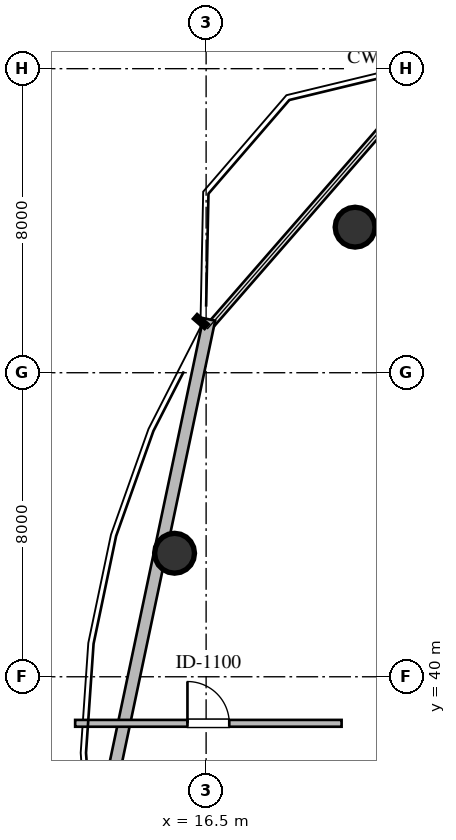
"""IFC4 building model, lengths in metres.
Left out: names, types, materials, properties, quantities, classifications, styles, units other than length and angle.
Written with IfcOpenShell. Run it as: python <this file> out.ifc"""

import sys

from ifc_helpers import new_model, si_unit, direction, frame, frame_2d, origin, origin_2d, place, context, subcontext, project, spatial, rectangle, circle, extrude, element, fill, save


model = new_model("IFC4")
c1 = context("Model", 3, precision=1e-05, world=origin(), true_north=direction((0.0, 1.0)))
c2 = subcontext(c1, "Body", "Model", "MODEL_VIEW")
j1 = project(units=[si_unit("LENGTHUNIT", "METRE"), si_unit("PLANEANGLEUNIT", "RADIAN")], contexts=[c1])
p1 = place(None, origin())
s1 = spatial("IfcSite", under=j1, at=p1, CompositionType="ELEMENT")
p2 = place(p1, origin())
s2 = spatial("IfcBuilding", under=s1, at=p2, CompositionType="ELEMENT")
p3 = place(p2, frame((0.0, 0.0, 228.0)))
s3 = spatial("IfcBuildingStorey", under=s2, at=p3, CompositionType="ELEMENT", Elevation=228.0)
for number, where, z_axis, x_axis in (
    (1, (20.42, 51.83, 0.0), (0.0, 0.0, 1.0), (1.0, 0.0, 0.0)),
    (2, (15.67, 43.25, 0.0), (0.0, 0.0, 1.0), (1.0, 0.0, 0.0)),
):
    element("IfcColumn", number, at=place(p3, frame(where, z_axis=z_axis, x_axis=x_axis)), inside=s3, PredefinedType="COLUMN", context=c2, shape_type="SweptSolid", body=[
        extrude(circle(Radius=0.525, at=origin_2d()), origin(), (0.0, 0.0, 1.0), 3.6),
    ])
p4 = place(p3, frame((13.525, 34.903, 0.0), z_axis=(0.0, 0.0, 1.0), x_axis=(0.206301080321, 0.978488561128, 0.0)))
e3 = element("IfcWall", 3, at=p4, inside=s3, PredefinedType="STANDARD", context=c2, shape_type="SweptSolid", body=[
    extrude(rectangle(XDim=14.819, YDim=0.32, at=frame_2d((7.409, 0.0))), origin(), (0.0, 0.0, 1.0), 2.806),
])
p5 = place(p3, frame((13.054, 38.775, 0.0), z_axis=(0.0, 0.0, 1.0), x_axis=(1.0, 0.0, 0.0)))
e4 = element("IfcWall", 4, at=p5, inside=s3, PredefinedType="PARTITIONING", context=c2, shape_type="SweptSolid", body=[
    extrude(rectangle(XDim=7.011, YDim=0.18, at=frame_2d((3.505, 0.0))), origin(), (0.0, 0.0, 1.0), 3.36),
])
p6 = place(p5, frame((2.955, 0.0, 0.0)))
e5 = element("IfcOpeningElement", 5, at=p6, cuts=e4, PredefinedType="OPENING", context=c2, shape_type="SweptSolid", body=[
    extrude(rectangle(XDim=1.1, YDim=2.1, at=frame_2d((0.55, 1.05))), frame((0.0, 0.1, 0.0), z_axis=(0.0, -1.0, 0.0), x_axis=(1.0, 0.0, 0.0)), (0.0, 0.0, 1.0), 0.2),
])
p7 = place(p6, origin())
e6 = element("IfcDoor", 6, at=p7, inside=s3, OperationType="SINGLE_SWING_LEFT", PredefinedType="DOOR", context=c2, shape_type="SweptSolid", body=[
    extrude(rectangle(XDim=1.1, YDim=2.1, at=frame_2d((0.55, 1.05))), frame((0.0, 0.025, 0.0), z_axis=(0.0, -1.0, 0.0), x_axis=(1.0, 0.0, 0.0)), (0.0, 0.0, 1.0), 0.05),
])
fill(e5, e6)
save(model, sys.argv[1])
